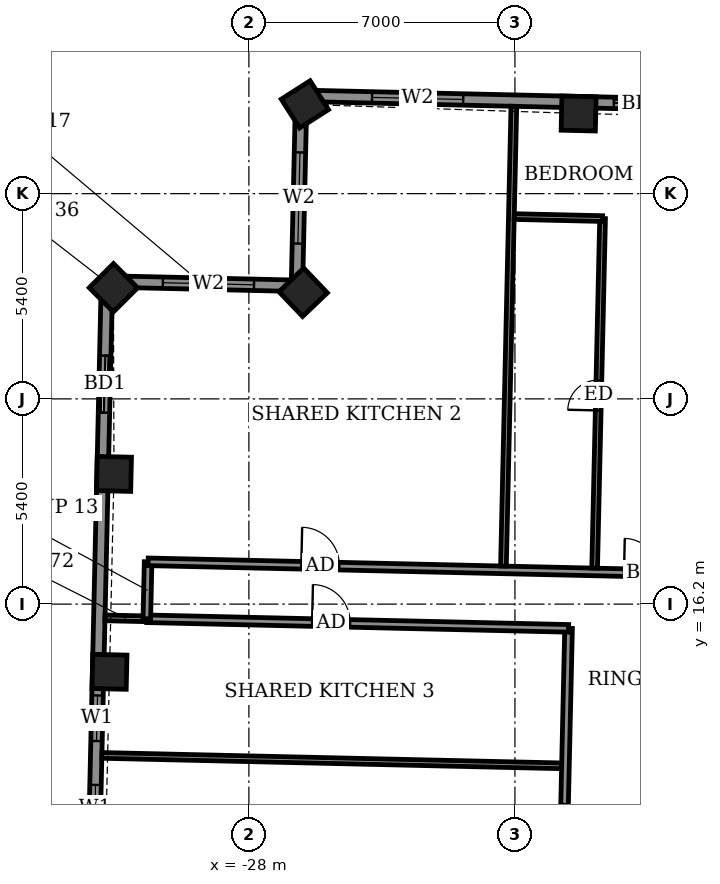
"""IFC4 building model, lengths in metres.
Left out: names, types, materials, properties, quantities, classifications, styles, units other than length and angle.
Written with IfcOpenShell. Run it as: python <this file> out.ifc"""

import sys

from ifc_helpers import new_model, si_unit, direction, frame, frame_2d, origin, origin_2d, place, context, subcontext, project, spatial, rectangle, extrude, element, fill, save


model = new_model("IFC4")
c1 = context("Model", 3, precision=1e-05, world=origin(), true_north=direction((0.0, 1.0)))
c2 = subcontext(c1, "Body", "Model", "MODEL_VIEW")
j1 = project(units=[si_unit("LENGTHUNIT", "METRE"), si_unit("PLANEANGLEUNIT", "RADIAN")], contexts=[c1])
p1 = place(None, origin())
s1 = spatial("IfcSite", under=j1, at=p1, CompositionType="ELEMENT")
p2 = place(p1, origin())
s2 = spatial("IfcBuilding", under=s1, at=p2, CompositionType="ELEMENT")
p3 = place(p2, frame((0.0, 0.0, 313.3)))
s3 = spatial("IfcBuildingStorey", under=s2, at=p3, CompositionType="ELEMENT", Elevation=313.3)
for number, where, z_axis, x_axis in (
    (1, (-19.324, 29.109, -0.55), (0.0, 0.0, 1.0), (-1.0, 0.023, 0.0)),
    (2, (-26.527, 29.349, -0.55), (0.0, 0.0, 1.0), (-0.843, -0.538, 0.0)),
    (3, (-26.572, 24.405, -0.55), (0.0, 0.0, 1.0), (-0.723, -0.691, 0.0)),
    (4, (-31.564, 24.524, -0.55), (0.0, 0.0, 1.0), (-0.709, -0.706, 0.0)),
    (5, (-31.55, 19.626, -0.55), (0.0, 0.0, 1.0), (-0.023, -1.0, 0.0)),
    (6, (-31.668, 14.419, -0.55), (0.0, 0.0, 1.0), (-0.023, -1.0, 0.0)),
):
    element("IfcColumn", number, at=place(p3, frame(where, z_axis=z_axis, x_axis=x_axis)), inside=s3, PredefinedType="COLUMN", context=c2, shape_type="SweptSolid", body=[
        extrude(rectangle(XDim=0.9, YDim=0.9, at=origin_2d()), origin(), (0.0, 0.0, 1.0), 3.6),
    ])
p4 = place(p3, frame((25.264, 28.397, 0.0), z_axis=(0.0, 0.0, 1.0), x_axis=(-0.999742391375, 0.022696935658, 0.0)))
e7 = element("IfcWall", 7, at=p4, inside=s3, PredefinedType="SOLIDWALL", context=c2, shape_type="SweptSolid", body=[
    extrude(rectangle(XDim=51.9, YDim=0.3, at=frame_2d((25.95, 0.0))), origin(), (0.0, 0.0, 1.0), 2.5),
])
p5 = place(p4, frame((1.898, 0.0, 0.0)))
e8 = element("IfcOpeningElement", 8, at=p5, cuts=e7, PredefinedType="OPENING", context=c2, shape_type="SweptSolid", body=[
    extrude(rectangle(XDim=1.5, YDim=2.4, at=frame_2d((0.75, 1.2))), frame((0.0, 0.16, 0.0), z_axis=(0.0, -1.0, 0.0), x_axis=(1.0, 0.0, 0.0)), (0.0, 0.0, 1.0), 0.32),
])
p6 = place(p4, frame((5.229, 0.0, 0.0)))
e9 = element("IfcOpeningElement", 9, at=p6, cuts=e7, PredefinedType="OPENING", context=c2, shape_type="SweptSolid", body=[
    extrude(rectangle(XDim=1.5, YDim=2.4, at=frame_2d((0.75, 1.2))), frame((0.0, 0.16, 0.0), z_axis=(0.0, -1.0, 0.0), x_axis=(1.0, 0.0, 0.0)), (0.0, 0.0, 1.0), 0.32),
])
p7 = place(p4, frame((10.7, 0.0, 0.0)))
e10 = element("IfcOpeningElement", 10, at=p7, cuts=e7, PredefinedType="OPENING", context=c2, shape_type="SweptSolid", body=[
    extrude(rectangle(XDim=1.5, YDim=2.4, at=frame_2d((0.75, 1.2))), frame((0.0, 0.16, 0.0), z_axis=(0.0, -1.0, 0.0), x_axis=(1.0, 0.0, 0.0)), (0.0, 0.0, 1.0), 0.32),
])
p8 = place(p4, frame((15.832, 0.0, 0.0)))
e11 = element("IfcOpeningElement", 11, at=p8, cuts=e7, PredefinedType="OPENING", context=c2, shape_type="SweptSolid", body=[
    extrude(rectangle(XDim=1.5, YDim=2.4, at=frame_2d((0.75, 1.2))), frame((0.0, 0.16, 0.0), z_axis=(0.0, -1.0, 0.0), x_axis=(1.0, 0.0, 0.0)), (0.0, 0.0, 1.0), 0.32),
])
p9 = place(p4, frame((19.361, 0.0, 0.0)))
e12 = element("IfcOpeningElement", 12, at=p9, cuts=e7, PredefinedType="OPENING", context=c2, shape_type="SweptSolid", body=[
    extrude(rectangle(XDim=1.5, YDim=2.4, at=frame_2d((0.75, 1.2))), frame((0.0, 0.16, 0.0), z_axis=(0.0, -1.0, 0.0), x_axis=(1.0, 0.0, 0.0)), (0.0, 0.0, 1.0), 0.32),
])
p10 = place(p4, frame((24.1, 0.0, 0.0)))
e13 = element("IfcOpeningElement", 13, at=p10, cuts=e7, PredefinedType="OPENING", context=c2, shape_type="SweptSolid", body=[
    extrude(rectangle(XDim=1.5, YDim=2.4, at=frame_2d((0.75, 1.2))), frame((0.0, 0.16, 0.0), z_axis=(0.0, -1.0, 0.0), x_axis=(1.0, 0.0, 0.0)), (0.0, 0.0, 1.0), 0.32),
])
p11 = place(p4, frame((27.539, 0.0, 0.0)))
e14 = element("IfcOpeningElement", 14, at=p11, cuts=e7, PredefinedType="OPENING", context=c2, shape_type="SweptSolid", body=[
    extrude(rectangle(XDim=1.5, YDim=2.4, at=frame_2d((0.75, 1.2))), frame((0.0, 0.16, 0.0), z_axis=(0.0, -1.0, 0.0), x_axis=(1.0, 0.0, 0.0)), (0.0, 0.0, 1.0), 0.32),
])
p12 = place(p4, frame((33.6, 0.0, 0.0)))
e15 = element("IfcOpeningElement", 15, at=p12, cuts=e7, PredefinedType="OPENING", context=c2, shape_type="SweptSolid", body=[
    extrude(rectangle(XDim=1.5, YDim=2.4, at=frame_2d((0.75, 1.2))), frame((0.0, 0.16, 0.0), z_axis=(0.0, -1.0, 0.0), x_axis=(1.0, 0.0, 0.0)), (0.0, 0.0, 1.0), 0.32),
])
p13 = place(p4, frame((38.643, 0.0, 0.0)))
e16 = element("IfcOpeningElement", 16, at=p13, cuts=e7, PredefinedType="OPENING", context=c2, shape_type="SweptSolid", body=[
    extrude(rectangle(XDim=1.5, YDim=2.4, at=frame_2d((0.75, 1.2))), frame((0.0, 0.16, 0.0), z_axis=(0.0, -1.0, 0.0), x_axis=(1.0, 0.0, 0.0)), (0.0, 0.0, 1.0), 0.32),
])
p14 = place(p4, frame((42.171, 0.0, 0.0)))
e17 = element("IfcOpeningElement", 17, at=p14, cuts=e7, PredefinedType="OPENING", context=c2, shape_type="SweptSolid", body=[
    extrude(rectangle(XDim=1.5, YDim=2.4, at=frame_2d((0.75, 1.2))), frame((0.0, 0.16, 0.0), z_axis=(0.0, -1.0, 0.0), x_axis=(1.0, 0.0, 0.0)), (0.0, 0.0, 1.0), 0.32),
])
p15 = place(p4, frame((47.637, 0.0, 0.9)))
e18 = element("IfcOpeningElement", 18, at=p15, cuts=e7, PredefinedType="OPENING", context=c2, shape_type="SweptSolid", body=[
    extrude(rectangle(XDim=2.4, YDim=1.5, at=frame_2d((1.2, 0.75))), frame((0.0, 0.16, 0.0), z_axis=(0.0, -1.0, 0.0), x_axis=(1.0, 0.0, 0.0)), (0.0, 0.0, 1.0), 0.32),
])
p16 = place(p3, frame((-26.623, 29.575, 0.0), z_axis=(0.0, 0.0, 1.0), x_axis=(-0.022606059803, -0.999744450377, 0.0)))
e19 = element("IfcWall", 19, at=p16, inside=s3, PredefinedType="SOLIDWALL", context=c2, shape_type="SweptSolid", body=[
    extrude(rectangle(XDim=5.0, YDim=0.3, at=frame_2d((2.5, 0.0))), origin(), (0.0, 0.0, 1.0), 2.55),
])
p17 = place(p16, frame((1.49, 0.0, 0.9)))
e20 = element("IfcOpeningElement", 20, at=p17, cuts=e19, PredefinedType="OPENING", context=c2, shape_type="SweptSolid", body=[
    extrude(rectangle(XDim=2.4, YDim=1.5, at=frame_2d((1.2, 0.75))), frame((0.0, 0.16, 0.0), z_axis=(0.0, -1.0, 0.0), x_axis=(1.0, 0.0, 0.0)), (0.0, 0.0, 1.0), 0.32),
])
p18 = place(p3, frame((-26.736, 24.576, 0.0), z_axis=(0.0, 0.0, 1.0), x_axis=(-0.999740017489, 0.022801259434, 0.0)))
e21 = element("IfcWall", 21, at=p18, inside=s3, PredefinedType="SOLIDWALL", context=c2, shape_type="SweptSolid", body=[
    extrude(rectangle(XDim=5.0, YDim=0.3, at=frame_2d((2.5, 0.0))), origin(), (0.0, 0.0, 1.0), 2.55),
])
p19 = place(p18, frame((1.129, 0.0, 0.9)))
e22 = element("IfcOpeningElement", 22, at=p19, cuts=e21, PredefinedType="OPENING", context=c2, shape_type="SweptSolid", body=[
    extrude(rectangle(XDim=2.4, YDim=1.5, at=frame_2d((1.2, 0.75))), frame((0.0, 0.16, 0.0), z_axis=(0.0, -1.0, 0.0), x_axis=(1.0, 0.0, 0.0)), (0.0, 0.0, 1.0), 0.32),
])
p20 = place(p3, frame((-31.735, 24.69, 0.0), z_axis=(0.0, 0.0, 1.0), x_axis=(-0.022694199758, -0.999742453484, 0.0)))
e23 = element("IfcWall", 23, at=p20, inside=s3, PredefinedType="SOLIDWALL", context=c2, shape_type="SweptSolid", body=[
    extrude(rectangle(XDim=15.9, YDim=0.3, at=frame_2d((7.95, 0.0))), origin(), (0.0, 0.0, 1.0), 2.55),
])
p21 = place(p20, frame((1.953, 0.0, 0.0)))
e24 = element("IfcOpeningElement", 24, at=p21, cuts=e23, PredefinedType="OPENING", context=c2, shape_type="SweptSolid", body=[
    extrude(rectangle(XDim=1.5, YDim=2.4, at=frame_2d((0.75, 1.2))), frame((0.0, 0.16, 0.0), z_axis=(0.0, -1.0, 0.0), x_axis=(1.0, 0.0, 0.0)), (0.0, 0.0, 1.0), 0.32),
])
p22 = place(p20, frame((10.896, 0.0, 0.9)))
e25 = element("IfcOpeningElement", 25, at=p22, cuts=e23, PredefinedType="OPENING", context=c2, shape_type="SweptSolid", body=[
    extrude(rectangle(XDim=1.2, YDim=1.5, at=frame_2d((0.6, 0.75))), frame((0.0, 0.16, 0.0), z_axis=(0.0, -1.0, 0.0), x_axis=(1.0, 0.0, 0.0)), (0.0, 0.0, 1.0), 0.32),
])
p23 = place(p20, frame((13.25, 0.0, 0.9)))
e26 = element("IfcOpeningElement", 26, at=p23, cuts=e23, PredefinedType="OPENING", context=c2, shape_type="SweptSolid", body=[
    extrude(rectangle(XDim=1.2, YDim=1.5, at=frame_2d((0.6, 0.75))), frame((0.0, 0.16, 0.0), z_axis=(0.0, -1.0, 0.0), x_axis=(1.0, 0.0, 0.0)), (0.0, 0.0, 1.0), 0.32),
])
p24 = place(p3, frame((-20.216, -12.081, 0.0), z_axis=(0.0, 0.0, 1.0), x_axis=(0.02267447203, 0.999742901109, 0.0)))
e27 = element("IfcWall", 27, at=p24, inside=s3, PredefinedType="PARTITIONING", context=c2, shape_type="SweptSolid", body=[
    extrude(rectangle(XDim=27.65, YDim=0.2, at=frame_2d((13.825, 0.0))), origin(), (0.0, 0.0, 1.0), 3.05),
])
p25 = place(p24, frame((22.025, 0.0, 0.0)))
e28 = element("IfcOpeningElement", 28, at=p25, cuts=e27, PredefinedType="OPENING", context=c2, shape_type="SweptSolid", body=[
    extrude(rectangle(XDim=1.0, YDim=2.1, at=frame_2d((0.5, 1.05))), frame((0.0, 0.11, 0.0), z_axis=(0.0, -1.0, 0.0), x_axis=(1.0, 0.0, 0.0)), (0.0, 0.0, 1.0), 0.22),
])
p26 = place(p24, frame((18.155, 0.0, 0.0)))
e29 = element("IfcOpeningElement", 29, at=p26, cuts=e27, PredefinedType="OPENING", context=c2, shape_type="SweptSolid", body=[
    extrude(rectangle(XDim=1.0, YDim=2.1, at=frame_2d((0.5, 1.05))), frame((0.0, 0.11, 0.0), z_axis=(0.0, -1.0, 0.0), x_axis=(1.0, 0.0, 0.0)), (0.0, 0.0, 1.0), 0.22),
])
p27 = place(p24, frame((13.898, 0.0, 0.0)))
e30 = element("IfcOpeningElement", 30, at=p27, cuts=e27, PredefinedType="OPENING", context=c2, shape_type="SweptSolid", body=[
    extrude(rectangle(XDim=1.0, YDim=2.1, at=frame_2d((0.5, 1.05))), frame((0.0, 0.11, 0.0), z_axis=(0.0, -1.0, 0.0), x_axis=(1.0, 0.0, 0.0)), (0.0, 0.0, 1.0), 0.22),
])
p28 = place(p24, frame((9.405, 0.0, 0.0)))
e31 = element("IfcOpeningElement", 31, at=p28, cuts=e27, PredefinedType="OPENING", context=c2, shape_type="SweptSolid", body=[
    extrude(rectangle(XDim=1.0, YDim=2.1, at=frame_2d((0.5, 1.05))), frame((0.0, 0.11, 0.0), z_axis=(0.0, -1.0, 0.0), x_axis=(1.0, 0.0, 0.0)), (0.0, 0.0, 1.0), 0.22),
])
p29 = place(p24, frame((5.837, 0.0, 0.0)))
e32 = element("IfcOpeningElement", 32, at=p29, cuts=e27, PredefinedType="OPENING", context=c2, shape_type="SweptSolid", body=[
    extrude(rectangle(XDim=1.0, YDim=2.1, at=frame_2d((0.5, 1.05))), frame((0.0, 0.11, 0.0), z_axis=(0.0, -1.0, 0.0), x_axis=(1.0, 0.0, 0.0)), (0.0, 0.0, 1.0), 0.22),
])
p30 = place(p24, frame((3.75, 0.0, 0.0)))
e33 = element("IfcOpeningElement", 33, at=p30, cuts=e27, PredefinedType="OPENING", context=c2, shape_type="SweptSolid", body=[
    extrude(rectangle(XDim=0.9, YDim=2.1, at=frame_2d((0.45, 1.05))), frame((0.0, 0.11, 0.0), z_axis=(0.0, -1.0, 0.0), x_axis=(1.0, 0.0, 0.0)), (0.0, 0.0, 1.0), 0.22),
])
p31 = place(p3, frame((-31.868, 12.219, 0.0), z_axis=(0.0, 0.0, 1.0), x_axis=(0.9997437175, -0.02263844782, 0.0)))
e34 = element("IfcWall", 34, at=p31, inside=s3, PredefinedType="PARTITIONING", context=c2, shape_type="SweptSolid", body=[
    extrude(rectangle(XDim=12.1, YDim=0.15, at=frame_2d((6.05, 0.0))), origin(), (0.0, 0.0, 1.0), 2.55),
])
p32 = place(p3, frame((-31.786, 15.838, 0.0), z_axis=(0.0, 0.0, 1.0), x_axis=(0.999745701647, -0.022550654924, 0.0)))
e35 = element("IfcWall", 35, at=p32, inside=s3, PredefinedType="PARTITIONING", context=c2, shape_type="SweptSolid", body=[
    extrude(rectangle(XDim=1.104, YDim=0.15, at=frame_2d((0.552, 0.0))), origin(), (0.0, 0.0, 1.0), 2.55),
])
p33 = place(p3, frame((-30.686, 15.814, 0.0), z_axis=(0.0, 0.0, 1.0), x_axis=(0.999742346277, -0.022698921993, 0.0)))
e36 = element("IfcWall", 36, at=p33, inside=s3, PredefinedType="PARTITIONING", context=c2, shape_type="SweptSolid", body=[
    extrude(rectangle(XDim=11.1, YDim=0.2, at=frame_2d((5.55, 0.0))), origin(), (0.0, 0.0, 1.0), 3.05),
])
p34 = place(p33, frame((4.35, 0.0, 0.0)))
e37 = element("IfcOpeningElement", 37, at=p34, cuts=e36, PredefinedType="OPENING", context=c2, shape_type="SweptSolid", body=[
    extrude(rectangle(XDim=1.0, YDim=2.1, at=frame_2d((0.5, 1.05))), frame((0.0, 0.11, 0.0), z_axis=(0.0, -1.0, 0.0), x_axis=(1.0, 0.0, 0.0)), (0.0, 0.0, 1.0), 0.22),
])
p35 = place(p3, frame((-30.686, 15.814, 0.0), z_axis=(0.0, 0.0, 1.0), x_axis=(0.022632637625, 0.99974384905, 0.0)))
e38 = element("IfcWall", 38, at=p35, inside=s3, PredefinedType="PARTITIONING", context=c2, shape_type="SweptSolid", body=[
    extrude(rectangle(XDim=1.5, YDim=0.2, at=frame_2d((0.75, 0.0))), origin(), (0.0, 0.0, 1.0), 3.05),
])
p36 = place(p3, frame((-30.652, 17.313, 0.0), z_axis=(0.0, 0.0, 1.0), x_axis=(0.999742623764, -0.02268669719, 0.0)))
e39 = element("IfcWall", 39, at=p36, inside=s3, PredefinedType="PARTITIONING", context=c2, shape_type="SweptSolid", body=[
    extrude(rectangle(XDim=58.8, YDim=0.2, at=frame_2d((29.4, 0.0))), origin(), (0.0, 0.0, 1.0), 3.05),
])
p37 = place(p36, frame((54.601, 0.0, 0.0)))
e40 = element("IfcOpeningElement", 40, at=p37, cuts=e39, PredefinedType="OPENING", context=c2, shape_type="SweptSolid", body=[
    extrude(rectangle(XDim=1.0, YDim=2.1, at=frame_2d((0.5, 1.05))), frame((0.0, 0.11, 0.0), z_axis=(0.0, -1.0, 0.0), x_axis=(1.0, 0.0, 0.0)), (0.0, 0.0, 1.0), 0.22),
])
p38 = place(p36, frame((49.35, 0.0, 0.0)))
e41 = element("IfcOpeningElement", 41, at=p38, cuts=e39, PredefinedType="OPENING", context=c2, shape_type="SweptSolid", body=[
    extrude(rectangle(XDim=0.9, YDim=2.1, at=frame_2d((0.45, 1.05))), frame((0.0, 0.11, 0.0), z_axis=(0.0, -1.0, 0.0), x_axis=(1.0, 0.0, 0.0)), (0.0, 0.0, 1.0), 0.22),
])
p39 = place(p36, frame((42.55, 0.0, 0.0)))
e42 = element("IfcOpeningElement", 42, at=p39, cuts=e39, PredefinedType="OPENING", context=c2, shape_type="SweptSolid", body=[
    extrude(rectangle(XDim=0.9, YDim=2.1, at=frame_2d((0.45, 1.05))), frame((0.0, 0.11, 0.0), z_axis=(0.0, -1.0, 0.0), x_axis=(1.0, 0.0, 0.0)), (0.0, 0.0, 1.0), 0.22),
])
p40 = place(p36, frame((40.475, 0.0, 0.0)))
e43 = element("IfcOpeningElement", 43, at=p40, cuts=e39, PredefinedType="OPENING", context=c2, shape_type="SweptSolid", body=[
    extrude(rectangle(XDim=0.9, YDim=2.1, at=frame_2d((0.45, 1.05))), frame((0.0, 0.11, 0.0), z_axis=(0.0, -1.0, 0.0), x_axis=(1.0, 0.0, 0.0)), (0.0, 0.0, 1.0), 0.22),
])
p41 = place(p36, frame((33.6, 0.0, 0.0)))
e44 = element("IfcOpeningElement", 44, at=p41, cuts=e39, PredefinedType="OPENING", context=c2, shape_type="SweptSolid", body=[
    extrude(rectangle(XDim=0.9, YDim=2.1, at=frame_2d((0.45, 1.05))), frame((0.0, 0.11, 0.0), z_axis=(0.0, -1.0, 0.0), x_axis=(1.0, 0.0, 0.0)), (0.0, 0.0, 1.0), 0.22),
])
p42 = place(p36, frame((31.55, 0.0, 0.0)))
e45 = element("IfcOpeningElement", 45, at=p42, cuts=e39, PredefinedType="OPENING", context=c2, shape_type="SweptSolid", body=[
    extrude(rectangle(XDim=0.9, YDim=2.1, at=frame_2d((0.45, 1.05))), frame((0.0, 0.11, 0.0), z_axis=(0.0, -1.0, 0.0), x_axis=(1.0, 0.0, 0.0)), (0.0, 0.0, 1.0), 0.22),
])
p43 = place(p36, frame((24.425, 0.0, 0.0)))
e46 = element("IfcOpeningElement", 46, at=p43, cuts=e39, PredefinedType="OPENING", context=c2, shape_type="SweptSolid", body=[
    extrude(rectangle(XDim=0.9, YDim=2.1, at=frame_2d((0.45, 1.05))), frame((0.0, 0.11, 0.0), z_axis=(0.0, -1.0, 0.0), x_axis=(1.0, 0.0, 0.0)), (0.0, 0.0, 1.0), 0.22),
])
p44 = place(p36, frame((22.05, 0.0, 0.0)))
e47 = element("IfcOpeningElement", 47, at=p44, cuts=e39, PredefinedType="OPENING", context=c2, shape_type="SweptSolid", body=[
    extrude(rectangle(XDim=0.9, YDim=2.1, at=frame_2d((0.45, 1.05))), frame((0.0, 0.11, 0.0), z_axis=(0.0, -1.0, 0.0), x_axis=(1.0, 0.0, 0.0)), (0.0, 0.0, 1.0), 0.22),
])
p45 = place(p36, frame((14.95, 0.0, 0.0)))
e48 = element("IfcOpeningElement", 48, at=p45, cuts=e39, PredefinedType="OPENING", context=c2, shape_type="SweptSolid", body=[
    extrude(rectangle(XDim=0.9, YDim=2.1, at=frame_2d((0.45, 1.05))), frame((0.0, 0.11, 0.0), z_axis=(0.0, -1.0, 0.0), x_axis=(1.0, 0.0, 0.0)), (0.0, 0.0, 1.0), 0.22),
])
p46 = place(p36, frame((12.525, 0.0, 0.0)))
e49 = element("IfcOpeningElement", 49, at=p46, cuts=e39, PredefinedType="OPENING", context=c2, shape_type="SweptSolid", body=[
    extrude(rectangle(XDim=0.9, YDim=2.1, at=frame_2d((0.45, 1.05))), frame((0.0, 0.11, 0.0), z_axis=(0.0, -1.0, 0.0), x_axis=(1.0, 0.0, 0.0)), (0.0, 0.0, 1.0), 0.22),
])
p47 = place(p36, frame((4.032, 0.0, 0.0)))
e50 = element("IfcOpeningElement", 50, at=p47, cuts=e39, PredefinedType="OPENING", context=c2, shape_type="SweptSolid", body=[
    extrude(rectangle(XDim=1.0, YDim=2.1, at=frame_2d((0.5, 1.05))), frame((0.0, 0.11, 0.0), z_axis=(0.0, -1.0, 0.0), x_axis=(1.0, 0.0, 0.0)), (0.0, 0.0, 1.0), 0.22),
])
p48 = place(p3, frame((-21.302, 17.201, 0.0), z_axis=(0.0, 0.0, 1.0), x_axis=(0.022637991173, 0.99974372784, 0.0)))
e51 = element("IfcWall", 51, at=p48, inside=s3, PredefinedType="PARTITIONING", context=c2, shape_type="SweptSolid", body=[
    extrude(rectangle(XDim=12.1, YDim=0.15, at=frame_2d((6.05, 0.0))), origin(), (0.0, 0.0, 1.0), 2.5),
])
p49 = place(p3, frame((-18.903, 17.147, 0.0), z_axis=(0.0, 0.0, 1.0), x_axis=(0.022717185456, 0.999741931443, 0.0)))
e52 = element("IfcWall", 52, at=p49, inside=s3, PredefinedType="PARTITIONING", context=c2, shape_type="SweptSolid", body=[
    extrude(rectangle(XDim=9.199, YDim=0.15, at=frame_2d((4.6, 0.0))), origin(), (0.0, 0.0, 1.0), 3.05),
])
p50 = place(p49, frame((4.15, 0.0, 0.0)))
e53 = element("IfcOpeningElement", 53, at=p50, cuts=e52, PredefinedType="OPENING", context=c2, shape_type="SweptSolid", body=[
    extrude(rectangle(XDim=0.8, YDim=2.1, at=frame_2d((0.4, 1.05))), frame((0.0, 0.085, 0.0), z_axis=(0.0, -1.0, 0.0), x_axis=(1.0, 0.0, 0.0)), (0.0, 0.0, 1.0), 0.17),
])
p51 = place(p3, frame((-21.019, 26.397, 0.0), z_axis=(0.0, 0.0, 1.0), x_axis=(0.999740478815, -0.022781023197, 0.0)))
e54 = element("IfcWall", 54, at=p51, inside=s3, PredefinedType="PARTITIONING", context=c2, shape_type="SweptSolid", body=[
    extrude(rectangle(XDim=2.325, YDim=0.15, at=frame_2d((1.163, 0.0))), origin(), (0.0, 0.0, 1.0), 3.05),
])
p52 = place(p14, origin())
e55 = element("IfcDoor", 55, at=p52, inside=s3, OperationType="SLIDING_TO_LEFT", PredefinedType="DOOR", context=c2, shape_type="SweptSolid", body=[
    extrude(rectangle(XDim=1.5, YDim=2.4, at=frame_2d((0.75, 1.2))), frame((0.0, 0.025, 0.0), z_axis=(0.0, -1.0, 0.0), x_axis=(1.0, 0.0, 0.0)), (0.0, 0.0, 1.0), 0.05),
])
fill(e17, e55)
p53 = place(p15, origin())
e56 = element("IfcWindow", 56, at=p53, inside=s3, PartitioningType="DOUBLE_PANEL_VERTICAL", PredefinedType="WINDOW", context=c2, shape_type="SweptSolid", body=[
    extrude(rectangle(XDim=2.4, YDim=1.5, at=frame_2d((1.2, 0.75))), frame((0.0, 0.03, 0.0), z_axis=(0.0, -1.0, 0.0), x_axis=(1.0, 0.0, 0.0)), (0.0, 0.0, 1.0), 0.06),
])
fill(e18, e56)
p54 = place(p17, origin())
e57 = element("IfcWindow", 57, at=p54, inside=s3, PartitioningType="DOUBLE_PANEL_VERTICAL", PredefinedType="WINDOW", context=c2, shape_type="SweptSolid", body=[
    extrude(rectangle(XDim=2.4, YDim=1.5, at=frame_2d((1.2, 0.75))), frame((0.0, 0.03, 0.0), z_axis=(0.0, -1.0, 0.0), x_axis=(1.0, 0.0, 0.0)), (0.0, 0.0, 1.0), 0.06),
])
fill(e20, e57)
p55 = place(p19, origin())
e58 = element("IfcWindow", 58, at=p55, inside=s3, PartitioningType="DOUBLE_PANEL_VERTICAL", PredefinedType="WINDOW", context=c2, shape_type="SweptSolid", body=[
    extrude(rectangle(XDim=2.4, YDim=1.5, at=frame_2d((1.2, 0.75))), frame((0.0, 0.03, 0.0), z_axis=(0.0, -1.0, 0.0), x_axis=(1.0, 0.0, 0.0)), (0.0, 0.0, 1.0), 0.06),
])
fill(e22, e58)
p56 = place(p21, origin())
e59 = element("IfcDoor", 59, at=p56, inside=s3, OperationType="SLIDING_TO_LEFT", PredefinedType="DOOR", context=c2, shape_type="SweptSolid", body=[
    extrude(rectangle(XDim=1.5, YDim=2.4, at=frame_2d((0.75, 1.2))), frame((0.0, 0.025, 0.0), z_axis=(0.0, -1.0, 0.0), x_axis=(1.0, 0.0, 0.0)), (0.0, 0.0, 1.0), 0.05),
])
fill(e24, e59)
p57 = place(p22, origin())
e60 = element("IfcWindow", 60, at=p57, inside=s3, PartitioningType="SINGLE_PANEL", PredefinedType="WINDOW", context=c2, shape_type="SweptSolid", body=[
    extrude(rectangle(XDim=1.2, YDim=1.5, at=frame_2d((0.6, 0.75))), frame((0.0, 0.03, 0.0), z_axis=(0.0, -1.0, 0.0), x_axis=(1.0, 0.0, 0.0)), (0.0, 0.0, 1.0), 0.06),
])
fill(e25, e60)
p58 = place(p23, origin())
e61 = element("IfcWindow", 61, at=p58, inside=s3, PartitioningType="SINGLE_PANEL", PredefinedType="WINDOW", context=c2, shape_type="SweptSolid", body=[
    extrude(rectangle(XDim=1.2, YDim=1.5, at=frame_2d((0.6, 0.75))), frame((0.0, 0.03, 0.0), z_axis=(0.0, -1.0, 0.0), x_axis=(1.0, 0.0, 0.0)), (0.0, 0.0, 1.0), 0.06),
])
fill(e26, e61)
p59 = place(p46, origin())
e62 = element("IfcDoor", 62, at=p59, inside=s3, OperationType="SINGLE_SWING_LEFT", PredefinedType="DOOR", context=c2, shape_type="SweptSolid", body=[
    extrude(rectangle(XDim=0.9, YDim=2.1, at=frame_2d((0.45, 1.05))), frame((0.0, 0.025, 0.0), z_axis=(0.0, -1.0, 0.0), x_axis=(1.0, 0.0, 0.0)), (0.0, 0.0, 1.0), 0.05),
])
fill(e49, e62)
p60 = place(p50, origin())
e63 = element("IfcDoor", 63, at=p60, inside=s3, OperationType="SINGLE_SWING_LEFT", PredefinedType="DOOR", context=c2, shape_type="SweptSolid", body=[
    extrude(rectangle(XDim=0.8, YDim=2.1, at=frame_2d((0.4, 1.05))), frame((0.0, 0.025, 0.0), z_axis=(0.0, -1.0, 0.0), x_axis=(1.0, 0.0, 0.0)), (0.0, 0.0, 1.0), 0.05),
])
fill(e53, e63)
p61 = place(p47, origin())
e64 = element("IfcDoor", 64, at=p61, inside=s3, OperationType="SINGLE_SWING_RIGHT", PredefinedType="DOOR", context=c2, shape_type="SweptSolid", body=[
    extrude(rectangle(XDim=1.0, YDim=2.1, at=frame_2d((0.5, 1.05))), frame((0.0, 0.025, 0.0), z_axis=(0.0, -1.0, 0.0), x_axis=(1.0, 0.0, 0.0)), (0.0, 0.0, 1.0), 0.05),
])
fill(e50, e64)
p62 = place(p34, origin())
e65 = element("IfcDoor", 65, at=p62, inside=s3, OperationType="SINGLE_SWING_LEFT", PredefinedType="DOOR", context=c2, shape_type="SweptSolid", body=[
    extrude(rectangle(XDim=1.0, YDim=2.1, at=frame_2d((0.5, 1.05))), frame((0.0, 0.025, 0.0), z_axis=(0.0, -1.0, 0.0), x_axis=(1.0, 0.0, 0.0)), (0.0, 0.0, 1.0), 0.05),
])
fill(e37, e65)
p63 = place(p25, origin())
e66 = element("IfcDoor", 66, at=p63, inside=s3, OperationType="SINGLE_SWING_RIGHT", PredefinedType="DOOR", context=c2, shape_type="SweptSolid", body=[
    extrude(rectangle(XDim=1.0, YDim=2.1, at=frame_2d((0.5, 1.05))), frame((0.0, 0.025, 0.0), z_axis=(0.0, -1.0, 0.0), x_axis=(1.0, 0.0, 0.0)), (0.0, 0.0, 1.0), 0.05),
])
fill(e28, e66)
save(model, sys.argv[1])
